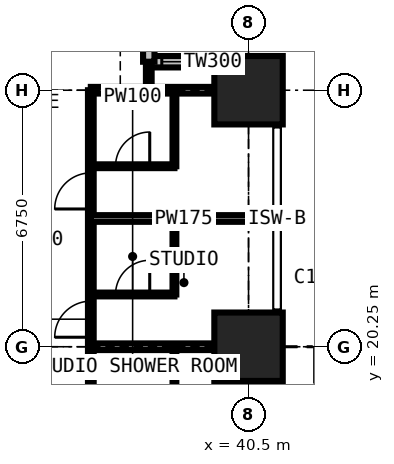
"""IFC4 building model, lengths in metres.
Left out: names, types, materials, properties, quantities, classifications, styles, units other than length and angle.
Written with IfcOpenShell. Run it as: python <this file> out.ifc"""

import sys

from ifc_helpers import new_model, si_unit, direction, frame, frame_2d, origin, origin_2d, place, context, subcontext, project, spatial, rectangle, extrude, element, fill, save


model = new_model("IFC4")
c1 = context("Model", 3, precision=1e-05, world=origin(), true_north=direction((0.0, 1.0)))
c2 = subcontext(c1, "Body", "Model", "MODEL_VIEW")
j1 = project(units=[si_unit("LENGTHUNIT", "METRE"), si_unit("PLANEANGLEUNIT", "RADIAN")], contexts=[c1])
p1 = place(None, origin())
s1 = spatial("IfcSite", under=j1, at=p1, CompositionType="ELEMENT")
p2 = place(p1, origin())
s2 = spatial("IfcBuilding", under=s1, at=p2, CompositionType="ELEMENT")
p3 = place(p2, frame((0.0, 0.0, 98.1)))
s3 = spatial("IfcBuildingStorey", under=s2, at=p3, CompositionType="ELEMENT", Elevation=98.1)
for number, where, z_axis, x_axis in (
    (1, (40.5, 20.25, 0.0), (0.0, 0.0, 1.0), (1.0, 0.0, 0.0)),
    (2, (40.5, 27.0, 0.0), (0.0, 0.0, 1.0), (1.0, 0.0, 0.0)),
):
    element("IfcColumn", number, at=place(p3, frame(where, z_axis=z_axis, x_axis=x_axis)), inside=s3, PredefinedType="COLUMN", context=c2, shape_type="SweptSolid", body=[
        extrude(rectangle(XDim=1.8, YDim=1.8, at=origin_2d()), origin(), (0.0, 0.0, 1.0), 3.6),
    ])
p4 = place(p3, frame((41.25, 27.75, 0.0), z_axis=(0.0, 0.0, 1.0), x_axis=(-1.0, 0.0, 0.0)))
e3 = element("IfcWall", 3, at=p4, inside=s3, PredefinedType="SOLIDWALL", context=c2, shape_type="SweptSolid", body=[
    extrude(rectangle(XDim=3.375, YDim=0.3, at=frame_2d((1.688, 0.0))), origin(), (0.0, 0.0, 1.0), 3.375),
])
p5 = place(p4, frame((1.833, 0.0, 0.9)))
e4 = element("IfcOpeningElement", 4, at=p5, cuts=e3, PredefinedType="OPENING", context=c2, shape_type="SweptSolid", body=[
    extrude(rectangle(XDim=1.2, YDim=1.8, at=frame_2d((0.6, 0.9))), frame((0.0, 0.16, 0.0), z_axis=(0.0, -1.0, 0.0), x_axis=(1.0, 0.0, 0.0)), (0.0, 0.0, 1.0), 0.32),
])
p6 = place(p3, frame((37.875, 27.75, 0.0), z_axis=(0.0, 0.0, 1.0), x_axis=(0.0, 1.0, 0.0)))
e5 = element("IfcWall", 5, at=p6, inside=s3, PredefinedType="SOLIDWALL", context=c2, shape_type="SweptSolid", body=[
    extrude(rectangle(XDim=3.375, YDim=0.3, at=frame_2d((1.688, 0.0))), origin(), (0.0, 0.0, 1.0), 3.375),
])
p7 = place(p6, frame((0.788, 0.0, 0.6)))
e6 = element("IfcOpeningElement", 6, at=p7, cuts=e5, PredefinedType="OPENING", context=c2, shape_type="SweptSolid", body=[
    extrude(rectangle(XDim=1.8, YDim=2.1, at=frame_2d((0.9, 1.05))), frame((0.0, 0.16, 0.0), z_axis=(0.0, -1.0, 0.0), x_axis=(1.0, 0.0, 0.0)), (0.0, 0.0, 1.0), 0.32),
])
p8 = place(p3, frame((36.35, 6.75, 0.0), z_axis=(0.0, 0.0, 1.0), x_axis=(0.0, 1.0, 0.0)))
e7 = element("IfcWall", 7, at=p8, inside=s3, PredefinedType="PARTITIONING", context=c2, shape_type="SweptSolid", body=[
    extrude(rectangle(XDim=20.25, YDim=0.15, at=frame_2d((10.125, 0.0))), origin(), (0.0, 0.0, 1.0), 3.375),
])
p9 = place(p8, frame((3.575, 0.0, 0.0)))
e8 = element("IfcOpeningElement", 8, at=p9, cuts=e7, PredefinedType="OPENING", context=c2, shape_type="SweptSolid", body=[
    extrude(rectangle(XDim=0.95, YDim=2.2, at=frame_2d((0.475, 1.1))), frame((0.0, 0.085, 0.0), z_axis=(0.0, -1.0, 0.0), x_axis=(1.0, 0.0, 0.0)), (0.0, 0.0, 1.0), 0.17),
])
p10 = place(p8, frame((7.0, 0.0, 0.0)))
e9 = element("IfcOpeningElement", 9, at=p10, cuts=e7, PredefinedType="OPENING", context=c2, shape_type="SweptSolid", body=[
    extrude(rectangle(XDim=0.95, YDim=2.2, at=frame_2d((0.475, 1.1))), frame((0.0, 0.085, 0.0), z_axis=(0.0, -1.0, 0.0), x_axis=(1.0, 0.0, 0.0)), (0.0, 0.0, 1.0), 0.17),
])
p11 = place(p8, frame((10.375, 0.0, 0.0)))
e10 = element("IfcOpeningElement", 10, at=p11, cuts=e7, PredefinedType="OPENING", context=c2, shape_type="SweptSolid", body=[
    extrude(rectangle(XDim=0.95, YDim=2.2, at=frame_2d((0.475, 1.1))), frame((0.0, 0.085, 0.0), z_axis=(0.0, -1.0, 0.0), x_axis=(1.0, 0.0, 0.0)), (0.0, 0.0, 1.0), 0.17),
])
p12 = place(p8, frame((13.75, 0.0, 0.0)))
e11 = element("IfcOpeningElement", 11, at=p12, cuts=e7, PredefinedType="OPENING", context=c2, shape_type="SweptSolid", body=[
    extrude(rectangle(XDim=0.95, YDim=2.2, at=frame_2d((0.475, 1.1))), frame((0.0, 0.085, 0.0), z_axis=(0.0, -1.0, 0.0), x_axis=(1.0, 0.0, 0.0)), (0.0, 0.0, 1.0), 0.17),
])
p13 = place(p8, frame((17.125, 0.0, 0.0)))
e12 = element("IfcOpeningElement", 12, at=p13, cuts=e7, PredefinedType="OPENING", context=c2, shape_type="SweptSolid", body=[
    extrude(rectangle(XDim=0.95, YDim=2.2, at=frame_2d((0.475, 1.1))), frame((0.0, 0.085, 0.0), z_axis=(0.0, -1.0, 0.0), x_axis=(1.0, 0.0, 0.0)), (0.0, 0.0, 1.0), 0.17),
])
p14 = place(p3, frame((36.35, 20.25, 0.0), z_axis=(0.0, 0.0, 1.0), x_axis=(1.0, 0.0, 0.0)))
e13 = element("IfcWall", 13, at=p14, inside=s3, PredefinedType="PARTITIONING", context=c2, shape_type="SweptSolid", body=[
    extrude(rectangle(XDim=4.884, YDim=0.175, at=frame_2d((2.442, 0.0))), origin(), (0.0, 0.0, 1.0), 2.61),
])
p15 = place(p3, frame((36.35, 21.625, 0.0), z_axis=(0.0, 0.0, 1.0), x_axis=(1.0, 0.0, 0.0)))
e14 = element("IfcWall", 14, at=p15, inside=s3, PredefinedType="PARTITIONING", context=c2, shape_type="SweptSolid", body=[
    extrude(rectangle(XDim=2.2, YDim=0.1, at=frame_2d((1.1, 0.0))), origin(), (0.0, 0.0, 1.0), 3.375),
])
p16 = place(p15, frame((0.65, 0.0, 0.0)))
e15 = element("IfcOpeningElement", 15, at=p16, cuts=e14, PredefinedType="OPENING", context=c2, shape_type="SweptSolid", body=[
    extrude(rectangle(XDim=0.9, YDim=2.2, at=frame_2d((0.45, 1.1))), frame((0.0, 0.06, 0.0), z_axis=(0.0, -1.0, 0.0), x_axis=(1.0, 0.0, 0.0)), (0.0, 0.0, 1.0), 0.12),
])
p17 = place(p3, frame((36.35, 23.625, 0.0), z_axis=(0.0, 0.0, 1.0), x_axis=(1.0, 0.0, 0.0)))
e16 = element("IfcWall", 16, at=p17, inside=s3, PredefinedType="PARTITIONING", context=c2, shape_type="SweptSolid", body=[
    extrude(rectangle(XDim=4.884, YDim=0.175, at=frame_2d((2.442, 0.0))), origin(), (0.0, 0.0, 1.0), 3.375),
])
p18 = place(p3, frame((36.35, 25.0, 0.0), z_axis=(0.0, 0.0, 1.0), x_axis=(1.0, 0.0, 0.0)))
e17 = element("IfcWall", 17, at=p18, inside=s3, PredefinedType="PARTITIONING", context=c2, shape_type="SweptSolid", body=[
    extrude(rectangle(XDim=2.2, YDim=0.1, at=frame_2d((1.1, 0.0))), origin(), (0.0, 0.0, 1.0), 3.375),
])
p19 = place(p18, frame((0.65, 0.0, 0.0)))
e18 = element("IfcOpeningElement", 18, at=p19, cuts=e17, PredefinedType="OPENING", context=c2, shape_type="SweptSolid", body=[
    extrude(rectangle(XDim=0.9, YDim=2.2, at=frame_2d((0.45, 1.1))), frame((0.0, 0.06, 0.0), z_axis=(0.0, -1.0, 0.0), x_axis=(1.0, 0.0, 0.0)), (0.0, 0.0, 1.0), 0.12),
])
p20 = place(p3, frame((36.35, 27.0, 0.0), z_axis=(0.0, 0.0, 1.0), x_axis=(1.0, 0.0, 0.0)))
e19 = element("IfcWall", 19, at=p20, inside=s3, PredefinedType="PARTITIONING", context=c2, shape_type="SweptSolid", body=[
    extrude(rectangle(XDim=4.884, YDim=0.175, at=frame_2d((2.442, 0.0))), origin(), (0.0, 0.0, 1.0), 2.877),
])
p21 = place(p3, frame((37.875, 27.0, 0.0), z_axis=(0.0, 0.0, 1.0), x_axis=(0.0, 1.0, 0.0)))
e20 = element("IfcWall", 20, at=p21, inside=s3, PredefinedType="PARTITIONING", context=c2, shape_type="SweptSolid", body=[
    extrude(rectangle(XDim=0.734, YDim=0.15, at=frame_2d((0.367, 0.0))), origin(), (0.0, 0.0, 1.0), 3.375),
])
for number, where, z_axis, x_axis in (
    (21, (38.55, 18.25, 0.0), (0.0, 0.0, 1.0), (0.0, 1.0, 0.0)),
    (22, (38.55, 21.625, 0.0), (0.0, 0.0, 1.0), (0.0, 1.0, 0.0)),
    (23, (38.55, 25.0, 0.0), (0.0, 0.0, 1.0), (0.0, 1.0, 0.0)),
):
    element("IfcWall", number, at=place(p3, frame(where, z_axis=z_axis, x_axis=x_axis)), inside=s3, PredefinedType="PARTITIONING", context=c2, shape_type="SweptSolid", body=[
        extrude(rectangle(XDim=2.0, YDim=0.1, at=frame_2d((1.0, 0.0))), origin(), (0.0, 0.0, 1.0), 3.375),
    ])
p22 = place(p5, origin())
e24 = element("IfcWindow", 24, at=p22, inside=s3, PartitioningType="SINGLE_PANEL", PredefinedType="WINDOW", context=c2, shape_type="SweptSolid", body=[
    extrude(rectangle(XDim=1.2, YDim=1.8, at=frame_2d((0.6, 0.9))), frame((0.0, 0.03, 0.0), z_axis=(0.0, -1.0, 0.0), x_axis=(1.0, 0.0, 0.0)), (0.0, 0.0, 1.0), 0.06),
])
fill(e4, e24)
p23 = place(p12, origin())
e25 = element("IfcDoor", 25, at=p23, inside=s3, OperationType="SINGLE_SWING_LEFT", PredefinedType="DOOR", context=c2, shape_type="SweptSolid", body=[
    extrude(rectangle(XDim=0.95, YDim=2.2, at=frame_2d((0.475, 1.1))), frame((0.0, 0.025, 0.0), z_axis=(0.0, -1.0, 0.0), x_axis=(1.0, 0.0, 0.0)), (0.0, 0.0, 1.0), 0.05),
])
fill(e11, e25)
p24 = place(p16, origin())
e26 = element("IfcDoor", 26, at=p24, inside=s3, OperationType="SINGLE_SWING_RIGHT", PredefinedType="DOOR", context=c2, shape_type="SweptSolid", body=[
    extrude(rectangle(XDim=0.9, YDim=2.2, at=frame_2d((0.45, 1.1))), frame((0.0, 0.025, 0.0), z_axis=(0.0, -1.0, 0.0), x_axis=(1.0, 0.0, 0.0)), (0.0, 0.0, 1.0), 0.05),
])
fill(e15, e26)
p25 = place(p13, origin())
e27 = element("IfcDoor", 27, at=p25, inside=s3, OperationType="SINGLE_SWING_LEFT", PredefinedType="DOOR", context=c2, shape_type="SweptSolid", body=[
    extrude(rectangle(XDim=0.95, YDim=2.2, at=frame_2d((0.475, 1.1))), frame((0.0, 0.025, 0.0), z_axis=(0.0, -1.0, 0.0), x_axis=(1.0, 0.0, 0.0)), (0.0, 0.0, 1.0), 0.05),
])
fill(e12, e27)
p26 = place(p19, origin())
e28 = element("IfcDoor", 28, at=p26, inside=s3, OperationType="SINGLE_SWING_RIGHT", PredefinedType="DOOR", context=c2, shape_type="SweptSolid", body=[
    extrude(rectangle(XDim=0.9, YDim=2.2, at=frame_2d((0.45, 1.1))), frame((0.0, 0.025, 0.0), z_axis=(0.0, -1.0, 0.0), x_axis=(1.0, 0.0, 0.0)), (0.0, 0.0, 1.0), 0.05),
])
fill(e18, e28)
save(model, sys.argv[1])
